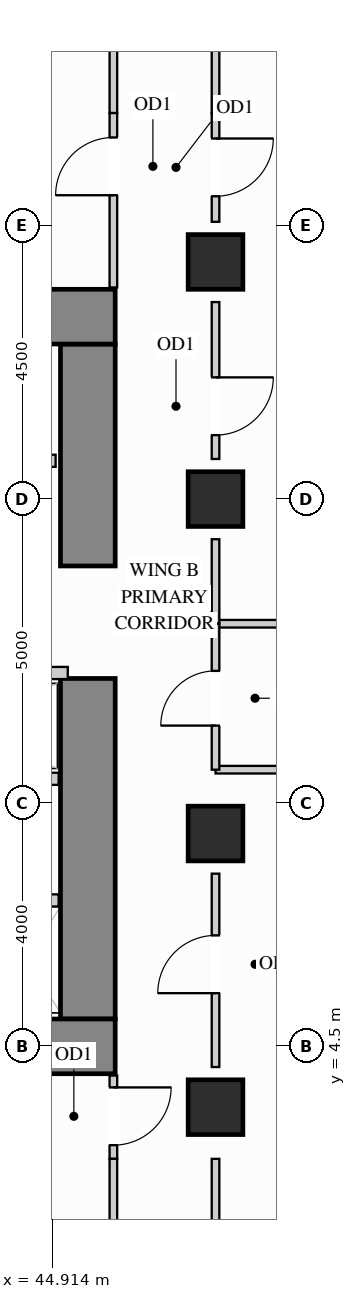
"""IFC4 building model, lengths in metres.
Left out: names, types, materials, properties, quantities, classifications, styles, units other than length and angle.
Written with IfcOpenShell. Run it as: python <this file> out.ifc"""

import sys

from ifc_helpers import new_model, si_unit, direction, frame, frame_2d, origin, origin_2d, place, context, subcontext, project, spatial, rectangle, extrude, source, transform, mapped, element, fill, save


model = new_model("IFC4")
c1 = context("Model", 3, precision=1e-05, world=origin(), true_north=direction((0.0, 1.0)))
c2 = subcontext(c1, "Body", "Model", "MODEL_VIEW")
j1 = project(units=[si_unit("LENGTHUNIT", "METRE"), si_unit("PLANEANGLEUNIT", "RADIAN")], contexts=[c1])
p1 = place(None, origin())
s1 = spatial("IfcSite", under=j1, at=p1, CompositionType="ELEMENT")
p2 = place(p1, origin())
s2 = spatial("IfcBuilding", under=s1, at=p2, CompositionType="ELEMENT")
p3 = place(p2, frame((0.0, 0.0, 29.7)))
s3 = spatial("IfcBuildingStorey", under=s2, at=p3, CompositionType="ELEMENT", Elevation=29.7)
m1 = source(origin(), c2, "Body", "SweptSolid", [
    extrude(rectangle(XDim=0.9, YDim=0.9, at=origin_2d()), origin(), (0.0, 0.0, 1.0), 3.38),
])
for number, where, z_axis, x_axis in (
    (1, (47.6, 13.5, 0.0), (0.0, 0.0, 1.0), (1.0, 0.0, 0.0)),
    (2, (47.6, 3.5, 0.0), (0.0, 0.0, 1.0), (1.0, 0.0, 0.0)),
    (3, (47.6, 8.0, 0.0), (0.0, 0.0, 1.0), (1.0, 0.0, 0.0)),
    (4, (47.6, 17.4, 0.0), (0.0, 0.0, 1.0), (1.0, 0.0, 0.0)),
):
    element("IfcColumn", number, at=place(p3, frame(where, z_axis=z_axis, x_axis=x_axis)), inside=s3, PredefinedType="COLUMN", context=c2, shape_type="MappedRepresentation", body=[
        mapped(m1, transform((0.0, 0.0, 0.0), x_axis=(1.0, 0.0, 0.0), y_axis=(0.0, 1.0, 0.0), z_axis=(0.0, 0.0, 1.0))),
    ])
m2 = source(origin(), c2, "Body", "SweptSolid", [
    extrude(rectangle(XDim=5.6, YDim=0.9, at=frame_2d((2.8, 0.0))), origin(), (0.0, 0.0, 1.0), 3.38),
])
p4 = place(p3, frame((45.5, 4.95, 0.0), z_axis=(0.0, 0.0, 1.0), x_axis=(0.0, 1.0, 0.0)))
e5 = element("IfcWall", 5, at=p4, inside=s3, PredefinedType="SHEAR", context=c2, shape_type="MappedRepresentation", body=[
    mapped(m2, transform((0.0, 0.0, 0.0), x_axis=(1.0, 0.0, 0.0), y_axis=(0.0, 1.0, 0.0), z_axis=(0.0, 0.0, 1.0))),
])
m3 = source(origin(), c2, "Body", "SweptSolid", [
    extrude(rectangle(XDim=3.65, YDim=0.9, at=frame_2d((1.825, 0.0))), origin(), (0.0, 0.0, 1.0), 3.38),
])
p5 = place(p3, frame((45.5, 12.4, 0.0), z_axis=(0.0, 0.0, 1.0), x_axis=(0.0, 1.0, 0.0)))
e6 = element("IfcWall", 6, at=p5, inside=s3, PredefinedType="SHEAR", context=c2, shape_type="MappedRepresentation", body=[
    mapped(m3, transform((0.0, 0.0, 0.0), x_axis=(1.0, 0.0, 0.0), y_axis=(0.0, 1.0, 0.0), z_axis=(0.0, 0.0, 1.0))),
])
m4 = source(origin(), c2, "Body", "SweptSolid", [
    extrude(rectangle(XDim=10.4, YDim=0.9, at=frame_2d((5.2, 0.0))), origin(), (0.0, 0.0, 1.0), 3.38),
])
for number, where, z_axis, x_axis in (
    (7, (35.55, 16.5, 0.0), (0.0, 0.0, 1.0), (1.0, 0.0, 0.0)),
    (8, (35.55, 4.5, 0.0), (0.0, 0.0, 1.0), (1.0, 0.0, 0.0)),
):
    element("IfcWall", number, at=place(p3, frame(where, z_axis=z_axis, x_axis=x_axis)), inside=s3, PredefinedType="SHEAR", context=c2, shape_type="MappedRepresentation", body=[
        mapped(m4, transform((0.0, 0.0, 0.0), x_axis=(1.0, 0.0, 0.0), y_axis=(0.0, 1.0, 0.0), z_axis=(0.0, 0.0, 1.0))),
    ])
m5 = source(origin(), c2, "Body", "SweptSolid", [
    extrude(rectangle(XDim=11.048, YDim=0.125, at=frame_2d((5.524, 0.0))), origin(), (0.0, 0.0, 1.0), 3.365),
])
for number, where, z_axis, x_axis in (
    (9, (47.6, 11.45, 0.0), (0.0, 0.0, 1.0), (1.0, 0.0, 0.0)),
    (10, (47.6, 9.05, 0.0), (0.0, 0.0, 1.0), (1.0, 0.0, 0.0)),
):
    element("IfcWall", number, at=place(p3, frame(where, z_axis=z_axis, x_axis=x_axis)), inside=s3, PredefinedType="PARTITIONING", context=c2, shape_type="MappedRepresentation", body=[
        mapped(m5, transform((0.0, 0.0, 0.0), x_axis=(1.0, 0.0, 0.0), y_axis=(0.0, 1.0, 0.0), z_axis=(0.0, 0.0, 1.0))),
    ])
p6 = place(p3, frame((47.6, 4.16, 0.0), z_axis=(0.0, 0.0, 1.0), x_axis=(0.0, 1.0, 0.0)))
e11 = element("IfcWall", 11, at=p6, inside=s3, PredefinedType="PARTITIONING", context=c2, shape_type="SweptSolid", body=[
    extrude(rectangle(XDim=3.18, YDim=0.125, at=frame_2d((1.59, 0.0))), origin(), (0.0, 0.0, 1.0), 2.67),
])
p7 = place(p6, frame((1.215, 0.0, 0.0)))
e12 = element("IfcOpeningElement", 12, at=p7, cuts=e11, PredefinedType="OPENING", context=c2, shape_type="SweptSolid", body=[
    extrude(rectangle(XDim=0.95, YDim=2.15, at=frame_2d((0.475, 1.075))), frame((0.0, 0.073, 0.0), z_axis=(0.0, -1.0, 0.0), x_axis=(1.0, 0.0, 0.0)), (0.0, 0.0, 1.0), 0.145),
])
m6 = source(origin(), c2, "Body", "SweptSolid", [
    extrude(rectangle(XDim=1.39, YDim=0.125, at=frame_2d((0.695, 0.0))), origin(), (0.0, 0.0, 1.0), 2.67),
])
p8 = place(p3, frame((47.6, 1.26, 0.0), z_axis=(0.0, 0.0, 1.0), x_axis=(0.0, 1.0, 0.0)))
e13 = element("IfcWall", 13, at=p8, inside=s3, PredefinedType="PARTITIONING", context=c2, shape_type="MappedRepresentation", body=[
    mapped(m6, transform((0.0, 0.0, 0.0), x_axis=(1.0, 0.0, 0.0), y_axis=(0.0, 1.0, 0.0), z_axis=(0.0, 0.0, 1.0))),
])
m7 = source(origin(), c2, "Body", "SweptSolid", [
    extrude(rectangle(XDim=1.39, YDim=0.125, at=frame_2d((0.695, 0.0))), origin(), (0.0, 0.0, 1.0), 2.67),
])
p9 = place(p3, frame((47.6, 11.45, 0.0), z_axis=(0.0, 0.0, 1.0), x_axis=(0.0, 1.0, 0.0)))
e14 = element("IfcWall", 14, at=p9, inside=s3, PredefinedType="PARTITIONING", context=c2, shape_type="MappedRepresentation", body=[
    mapped(m7, transform((0.0, 0.0, 0.0), x_axis=(1.0, 0.0, 0.0), y_axis=(0.0, 1.0, 0.0), z_axis=(0.0, 0.0, 1.0))),
])
p10 = place(p3, frame((47.6, 14.16, 0.0), z_axis=(0.0, 0.0, 1.0), x_axis=(0.0, 1.0, 0.0)))
e15 = element("IfcWall", 15, at=p10, inside=s3, PredefinedType="PARTITIONING", context=c2, shape_type="SweptSolid", body=[
    extrude(rectangle(XDim=2.58, YDim=0.125, at=frame_2d((1.29, 0.0))), origin(), (0.0, 0.0, 1.0), 2.67),
])
p11 = place(p10, frame((0.392, 0.0, 0.0)))
e16 = element("IfcOpeningElement", 16, at=p11, cuts=e15, PredefinedType="OPENING", context=c2, shape_type="SweptSolid", body=[
    extrude(rectangle(XDim=0.95, YDim=2.15, at=frame_2d((0.475, 1.075))), frame((0.0, 0.073, 0.0), z_axis=(0.0, -1.0, 0.0), x_axis=(1.0, 0.0, 0.0)), (0.0, 0.0, 1.0), 0.145),
])
p12 = place(p3, frame((47.6, 18.06, 0.0), z_axis=(0.0, 0.0, 1.0), x_axis=(0.0, 1.0, 0.0)))
e17 = element("IfcWall", 17, at=p12, inside=s3, PredefinedType="PARTITIONING", context=c2, shape_type="SweptSolid", body=[
    extrude(rectangle(XDim=1.79, YDim=0.125, at=frame_2d((0.895, 0.0))), origin(), (0.0, 0.0, 1.0), 2.67),
])
p13 = place(p12, frame((0.42, 0.0, 0.0)))
e18 = element("IfcOpeningElement", 18, at=p13, cuts=e17, PredefinedType="OPENING", context=c2, shape_type="SweptSolid", body=[
    extrude(rectangle(XDim=0.95, YDim=2.15, at=frame_2d((0.475, 1.075))), frame((0.0, 0.073, 0.0), z_axis=(0.0, -1.0, 0.0), x_axis=(1.0, 0.0, 0.0)), (0.0, 0.0, 1.0), 0.145),
])
p14 = place(p3, frame((47.6, 19.85, 0.0), z_axis=(0.0, 0.0, 1.0), x_axis=(0.0, 1.0, 0.0)))
e19 = element("IfcWall", 19, at=p14, inside=s3, PredefinedType="PARTITIONING", context=c2, shape_type="MappedRepresentation", body=[
    mapped(m6, transform((0.0, 0.0, 0.0), x_axis=(1.0, 0.0, 0.0), y_axis=(0.0, 1.0, 0.0), z_axis=(0.0, 0.0, 1.0))),
])
p15 = place(p3, frame((47.6, 9.05, 0.0), z_axis=(0.0, 0.0, 1.0), x_axis=(0.0, 1.0, 0.0)))
e20 = element("IfcWall", 20, at=p15, inside=s3, PredefinedType="PARTITIONING", context=c2, shape_type="SweptSolid", body=[
    extrude(rectangle(XDim=2.4, YDim=0.125, at=frame_2d((1.2, 0.0))), origin(), (0.0, 0.0, 1.0), 2.67),
])
p16 = place(p15, frame((0.725, 0.0, 0.0)))
e21 = element("IfcOpeningElement", 21, at=p16, cuts=e20, PredefinedType="OPENING", context=c2, shape_type="SweptSolid", body=[
    extrude(rectangle(XDim=0.9, YDim=2.15, at=frame_2d((0.45, 1.075))), frame((0.0, 0.073, 0.0), z_axis=(0.0, -1.0, 0.0), x_axis=(1.0, 0.0, 0.0)), (0.0, 0.0, 1.0), 0.145),
])
p17 = place(p3, frame((45.92, 16.98, 0.0), z_axis=(0.0, 0.0, 1.0), x_axis=(0.0, 1.0, 0.0)))
e22 = element("IfcWall", 22, at=p17, inside=s3, PredefinedType="PARTITIONING", context=c2, shape_type="SweptSolid", body=[
    extrude(rectangle(XDim=2.87, YDim=0.125, at=frame_2d((1.435, 0.0))), origin(), (0.0, 0.0, 1.0), 3.365),
])
p18 = place(p17, frame((1.517, 0.0, 0.0)))
e23 = element("IfcOpeningElement", 23, at=p18, cuts=e22, PredefinedType="OPENING", context=c2, shape_type="SweptSolid", body=[
    extrude(rectangle(XDim=0.95, YDim=2.15, at=frame_2d((0.475, 1.075))), frame((0.0, 0.073, 0.0), z_axis=(0.0, -1.0, 0.0), x_axis=(1.0, 0.0, 0.0)), (0.0, 0.0, 1.0), 0.145),
])
m8 = source(origin(), c2, "Body", "SweptSolid", [
    extrude(rectangle(XDim=2.298, YDim=0.125, at=frame_2d((1.149, 0.0))), origin(), (0.0, 0.0, 1.0), 3.365),
])
p19 = place(p3, frame((45.92, 19.85, 0.0), z_axis=(0.0, 0.0, 1.0), x_axis=(0.0, 1.0, 0.0)))
e24 = element("IfcWall", 24, at=p19, inside=s3, PredefinedType="PARTITIONING", context=c2, shape_type="MappedRepresentation", body=[
    mapped(m8, transform((0.0, 0.0, 0.0), x_axis=(1.0, 0.0, 0.0), y_axis=(0.0, 1.0, 0.0), z_axis=(0.0, 0.0, 1.0))),
])
p20 = place(p3, frame((45.92, 2.65, 0.0), z_axis=(0.0, 0.0, 1.0), x_axis=(0.0, 1.0, 0.0)))
e25 = element("IfcWall", 25, at=p20, inside=s3, PredefinedType="PARTITIONING", context=c2, shape_type="SweptSolid", body=[
    extrude(rectangle(XDim=1.37, YDim=0.125, at=frame_2d((0.685, 0.0))), origin(), (0.0, 0.0, 1.0), 3.365),
])
p21 = place(p20, frame((0.225, 0.0, 0.0)))
e26 = element("IfcOpeningElement", 26, at=p21, cuts=e25, PredefinedType="OPENING", context=c2, shape_type="SweptSolid", body=[
    extrude(rectangle(XDim=0.95, YDim=2.15, at=frame_2d((0.475, 1.075))), frame((0.0, 0.073, 0.0), z_axis=(0.0, -1.0, 0.0), x_axis=(1.0, 0.0, 0.0)), (0.0, 0.0, 1.0), 0.145),
])
p22 = place(p3, frame((45.92, 0.352, 0.0), z_axis=(0.0, 0.0, 1.0), x_axis=(0.0, 1.0, 0.0)))
e27 = element("IfcWall", 27, at=p22, inside=s3, PredefinedType="PARTITIONING", context=c2, shape_type="MappedRepresentation", body=[
    mapped(m8, transform((0.0, 0.0, 0.0), x_axis=(1.0, 0.0, 0.0), y_axis=(0.0, 1.0, 0.0), z_axis=(0.0, 0.0, 1.0))),
])
m9 = source(origin(), c2, "Body", "SweptSolid", [
    extrude(rectangle(XDim=1.17, YDim=0.2, at=frame_2d((0.585, 0.0))), origin(), (0.0, 0.0, 1.0), 3.365),
])
p23 = place(p3, frame((43.85, 6.9, 0.0), z_axis=(0.0, 0.0, 1.0), x_axis=(1.0, 0.0, 0.0)))
e28 = element("IfcWall", 28, at=p23, inside=s3, PredefinedType="PARTITIONING", context=c2, shape_type="MappedRepresentation", body=[
    mapped(m9, transform((0.0, 0.0, 0.0), x_axis=(1.0, 0.0, 0.0), y_axis=(0.0, 1.0, 0.0), z_axis=(0.0, 0.0, 1.0))),
])
p24 = place(p3, frame((42.23, 14.13, 0.0), z_axis=(0.0, 0.0, 1.0), x_axis=(1.0, 0.0, 0.0)))
e29 = element("IfcWall", 29, at=p24, inside=s3, PredefinedType="PARTITIONING", context=c2, shape_type="SweptSolid", body=[
    extrude(rectangle(XDim=2.74, YDim=0.2, at=frame_2d((1.37, 0.0))), origin(), (0.0, 0.0, 1.0), 3.365),
])
p25 = place(p24, frame((0.82, 0.0, 0.0)))
e30 = element("IfcOpeningElement", 30, at=p25, cuts=e29, PredefinedType="OPENING", context=c2, shape_type="SweptSolid", body=[
    extrude(rectangle(XDim=1.1, YDim=2.2, at=frame_2d((0.55, 1.1))), frame((0.0, 0.11, 0.0), z_axis=(0.0, -1.0, 0.0), x_axis=(1.0, 0.0, 0.0)), (0.0, 0.0, 1.0), 0.22),
])
m10 = source(origin(), c2, "Body", "SweptSolid", [
    extrude(rectangle(XDim=3.49, YDim=0.2, at=frame_2d((1.745, 0.0))), origin(), (0.0, 0.0, 1.0), 3.365),
])
p26 = place(p3, frame((41.68, 10.64, 0.0), z_axis=(0.0, 0.0, 1.0), x_axis=(1.0, 0.0, 0.0)))
e31 = element("IfcWall", 31, at=p26, inside=s3, PredefinedType="PARTITIONING", context=c2, shape_type="MappedRepresentation", body=[
    mapped(m10, transform((0.0, 0.0, 0.0), x_axis=(1.0, 0.0, 0.0), y_axis=(0.0, 1.0, 0.0), z_axis=(0.0, 0.0, 1.0))),
])
m11 = source(origin(), c2, "Body", "SweptSolid", [
    extrude(rectangle(XDim=3.34, YDim=0.2, at=frame_2d((1.67, 0.0))), origin(), (0.0, 0.0, 1.0), 3.365),
])
p27 = place(p3, frame((41.68, 8.9, 0.0), z_axis=(0.0, 0.0, 1.0), x_axis=(1.0, 0.0, 0.0)))
e32 = element("IfcWall", 32, at=p27, inside=s3, PredefinedType="PARTITIONING", context=c2, shape_type="MappedRepresentation", body=[
    mapped(m11, transform((0.0, 0.0, 0.0), x_axis=(1.0, 0.0, 0.0), y_axis=(0.0, 1.0, 0.0), z_axis=(0.0, 0.0, 1.0))),
])
m12 = source(origin(), c2, "Body", "SweptSolid", [
    extrude(rectangle(XDim=0.95, YDim=2.15, at=frame_2d((0.475, 1.075))), frame((0.0, 0.025, 0.0), z_axis=(0.0, -1.0, 0.0), x_axis=(1.0, 0.0, 0.0)), (0.0, 0.0, 1.0), 0.05),
])
p28 = place(p18, origin())
e33 = element("IfcDoor", 33, at=p28, inside=s3, OperationType="SINGLE_SWING_LEFT", PredefinedType="DOOR", context=c2, shape_type="MappedRepresentation", body=[
    mapped(m12, transform((0.0, 0.0, 0.0), x_axis=(1.0, 0.0, 0.0), y_axis=(0.0, 1.0, 0.0), z_axis=(0.0, 0.0, 1.0))),
])
fill(e23, e33)
p29 = place(p21, origin())
e34 = element("IfcDoor", 34, at=p29, inside=s3, OperationType="SINGLE_SWING_RIGHT", PredefinedType="DOOR", context=c2, shape_type="MappedRepresentation", body=[
    mapped(m12, transform((0.0, 0.0, 0.0), x_axis=(1.0, 0.0, 0.0), y_axis=(0.0, 1.0, 0.0), z_axis=(0.0, 0.0, 1.0))),
])
fill(e26, e34)
p30 = place(p7, origin())
e35 = element("IfcDoor", 35, at=p30, inside=s3, OperationType="SINGLE_SWING_LEFT", PredefinedType="DOOR", context=c2, shape_type="MappedRepresentation", body=[
    mapped(m12, transform((0.0, 0.0, 0.0), x_axis=(1.0, 0.0, 0.0), y_axis=(0.0, 1.0, 0.0), z_axis=(0.0, 0.0, 1.0))),
])
fill(e12, e35)
p31 = place(p11, origin())
e36 = element("IfcDoor", 36, at=p31, inside=s3, OperationType="SINGLE_SWING_RIGHT", PredefinedType="DOOR", context=c2, shape_type="MappedRepresentation", body=[
    mapped(m12, transform((0.0, 0.0, 0.0), x_axis=(1.0, 0.0, 0.0), y_axis=(0.0, 1.0, 0.0), z_axis=(0.0, 0.0, 1.0))),
])
fill(e16, e36)
p32 = place(p13, origin())
e37 = element("IfcDoor", 37, at=p32, inside=s3, OperationType="SINGLE_SWING_RIGHT", PredefinedType="DOOR", context=c2, shape_type="MappedRepresentation", body=[
    mapped(m12, transform((0.0, 0.0, 0.0), x_axis=(1.0, 0.0, 0.0), y_axis=(0.0, 1.0, 0.0), z_axis=(0.0, 0.0, 1.0))),
])
fill(e18, e37)
m13 = source(origin(), c2, "Body", "SweptSolid", [
    extrude(rectangle(XDim=0.9, YDim=2.15, at=frame_2d((0.45, 1.075))), frame((0.0, 0.025, 0.0), z_axis=(0.0, -1.0, 0.0), x_axis=(1.0, 0.0, 0.0)), (0.0, 0.0, 1.0), 0.05),
])
p33 = place(p16, origin())
e38 = element("IfcDoor", 38, at=p33, inside=s3, OperationType="SINGLE_SWING_LEFT", PredefinedType="DOOR", context=c2, shape_type="MappedRepresentation", body=[
    mapped(m13, transform((0.0, 0.0, 0.0), x_axis=(1.0, 0.0, 0.0), y_axis=(0.0, 1.0, 0.0), z_axis=(0.0, 0.0, 1.0))),
])
fill(e21, e38)
save(model, sys.argv[1])
